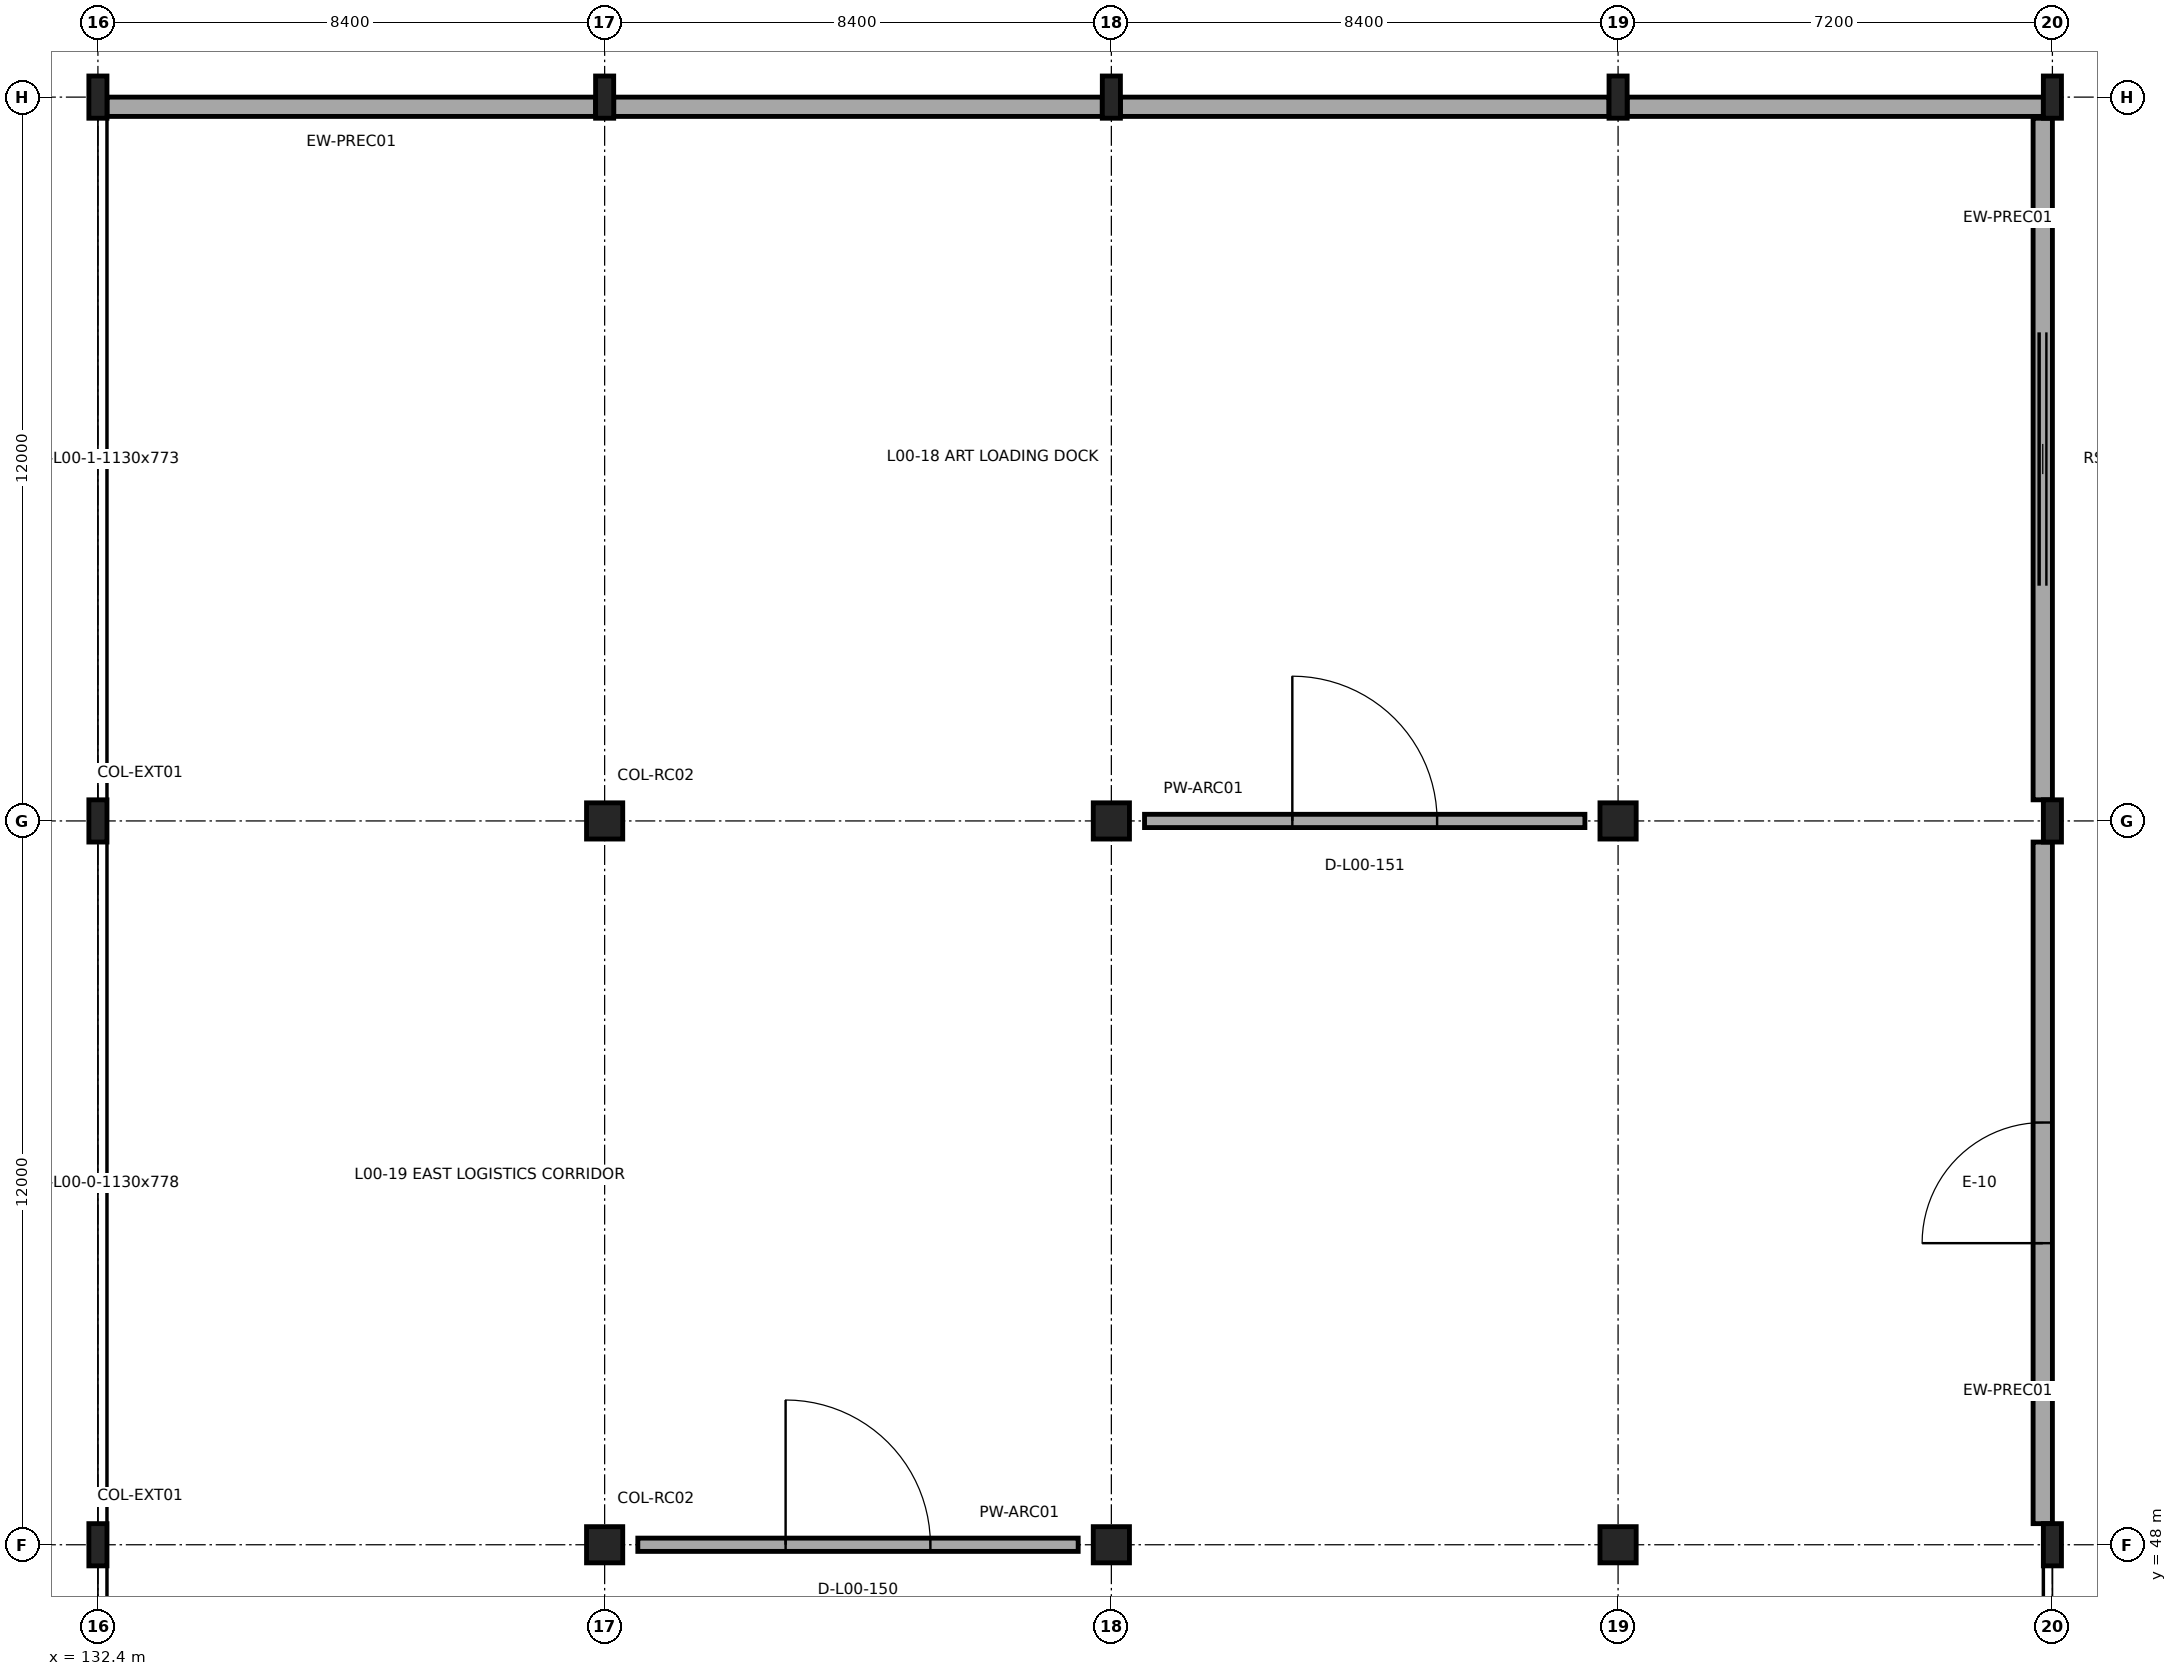
"""IFC4 building model, lengths in metres.
Left out: names, types, materials, properties, quantities, classifications, styles, units other than length and angle.
Written with IfcOpenShell. Run it as: python <this file> out.ifc"""

import sys

from ifc_helpers import new_model, si_unit, direction, frame, frame_2d, origin, origin_2d, place, context, subcontext, project, spatial, rectangle, i_section, extrude, element, fill, save


model = new_model("IFC4")
c1 = context("Model", 3, precision=1e-05, world=origin(), true_north=direction((0.0, 1.0)))
c2 = subcontext(c1, "Body", "Model", "MODEL_VIEW")
j1 = project(units=[si_unit("LENGTHUNIT", "METRE"), si_unit("PLANEANGLEUNIT", "RADIAN")], contexts=[c1])
p1 = place(None, origin())
s1 = spatial("IfcSite", under=j1, at=p1, CompositionType="ELEMENT")
p2 = place(p1, origin())
s2 = spatial("IfcBuilding", under=s1, at=p2, CompositionType="ELEMENT")
p3 = place(p2, origin())
s3 = spatial("IfcBuildingStorey", under=s2, at=p3, CompositionType="ELEMENT", Elevation=0.0)
for number, where, z_axis, x_axis in (
    (1, (132.4, 48.0, 0.0), (0.0, 0.0, 1.0), (1.0, 0.0, 0.0)),
    (2, (132.4, 60.0, 0.0), (0.0, 0.0, 1.0), (1.0, 0.0, 0.0)),
    (3, (132.4, 72.0, 0.0), (0.0, 0.0, 1.0), (1.0, 0.0, 0.0)),
):
    element("IfcColumn", number, at=place(p3, frame(where, z_axis=z_axis, x_axis=x_axis)), inside=s3, PredefinedType="COLUMN", context=c2, shape_type="SweptSolid", body=[
        extrude(i_section(OverallWidth=0.3, OverallDepth=0.7, WebThickness=0.017, FlangeThickness=0.032, FilletRadius=0.027, at=origin_2d()), origin(), (0.0, 0.0, 1.0), 8.4),
    ])
for number, where, z_axis, x_axis in (
    (4, (140.8, 48.0, 0.0), (0.0, 0.0, 1.0), (1.0, 0.0, 0.0)),
    (5, (140.8, 60.0, 0.0), (0.0, 0.0, 1.0), (1.0, 0.0, 0.0)),
):
    element("IfcColumn", number, at=place(p3, frame(where, z_axis=z_axis, x_axis=x_axis)), inside=s3, PredefinedType="COLUMN", context=c2, shape_type="SweptSolid", body=[
        extrude(rectangle(XDim=0.6, YDim=0.6, at=origin_2d()), origin(), (0.0, 0.0, 1.0), 8.4),
    ])
p4 = place(p3, frame((140.8, 72.0, 0.0), z_axis=(0.0, 0.0, 1.0), x_axis=(1.0, 0.0, 0.0)))
e6 = element("IfcColumn", 6, at=p4, inside=s3, PredefinedType="COLUMN", context=c2, shape_type="SweptSolid", body=[
    extrude(i_section(OverallWidth=0.3, OverallDepth=0.7, WebThickness=0.017, FlangeThickness=0.032, FilletRadius=0.027, at=origin_2d()), origin(), (0.0, 0.0, 1.0), 8.4),
])
for number, where, z_axis, x_axis in (
    (7, (149.2, 48.0, 0.0), (0.0, 0.0, 1.0), (1.0, 0.0, 0.0)),
    (8, (149.2, 60.0, 0.0), (0.0, 0.0, 1.0), (1.0, 0.0, 0.0)),
):
    element("IfcColumn", number, at=place(p3, frame(where, z_axis=z_axis, x_axis=x_axis)), inside=s3, PredefinedType="COLUMN", context=c2, shape_type="SweptSolid", body=[
        extrude(rectangle(XDim=0.6, YDim=0.6, at=origin_2d()), origin(), (0.0, 0.0, 1.0), 8.4),
    ])
p5 = place(p3, frame((149.2, 72.0, 0.0), z_axis=(0.0, 0.0, 1.0), x_axis=(1.0, 0.0, 0.0)))
e9 = element("IfcColumn", 9, at=p5, inside=s3, PredefinedType="COLUMN", context=c2, shape_type="SweptSolid", body=[
    extrude(i_section(OverallWidth=0.3, OverallDepth=0.7, WebThickness=0.017, FlangeThickness=0.032, FilletRadius=0.027, at=origin_2d()), origin(), (0.0, 0.0, 1.0), 8.4),
])
for number, where, z_axis, x_axis in (
    (10, (157.6, 48.0, 0.0), (0.0, 0.0, 1.0), (1.0, 0.0, 0.0)),
    (11, (157.6, 60.0, 0.0), (0.0, 0.0, 1.0), (1.0, 0.0, 0.0)),
):
    element("IfcColumn", number, at=place(p3, frame(where, z_axis=z_axis, x_axis=x_axis)), inside=s3, PredefinedType="COLUMN", context=c2, shape_type="SweptSolid", body=[
        extrude(rectangle(XDim=0.6, YDim=0.6, at=origin_2d()), origin(), (0.0, 0.0, 1.0), 8.4),
    ])
for number, where, z_axis, x_axis in (
    (12, (157.6, 72.0, 0.0), (0.0, 0.0, 1.0), (1.0, 0.0, 0.0)),
    (13, (164.8, 48.0, 0.0), (0.0, 0.0, 1.0), (1.0, 0.0, 0.0)),
    (14, (164.8, 60.0, 0.0), (0.0, 0.0, 1.0), (1.0, 0.0, 0.0)),
    (15, (164.8, 72.0, 0.0), (0.0, 0.0, 1.0), (1.0, 0.0, 0.0)),
):
    element("IfcColumn", number, at=place(p3, frame(where, z_axis=z_axis, x_axis=x_axis)), inside=s3, PredefinedType="COLUMN", context=c2, shape_type="SweptSolid", body=[
        extrude(i_section(OverallWidth=0.3, OverallDepth=0.7, WebThickness=0.017, FlangeThickness=0.032, FilletRadius=0.027, at=origin_2d()), origin(), (0.0, 0.0, 1.0), 8.4),
    ])
p6 = place(p3, frame((164.64, 48.35, 0.0), z_axis=(0.0, 0.0, 1.0), x_axis=(0.0, 1.0, 0.0)))
e16 = element("IfcWall", 16, at=p6, inside=s3, PredefinedType="SOLIDWALL", context=c2, shape_type="SweptSolid", body=[
    extrude(rectangle(XDim=11.3, YDim=0.32, at=frame_2d((5.65, 0.0))), origin(), (0.0, 0.0, 1.0), 7.78),
])
p7 = place(p6, frame((4.65, 0.0, 0.0)))
e17 = element("IfcOpeningElement", 17, at=p7, cuts=e16, PredefinedType="OPENING", context=c2, shape_type="SweptSolid", body=[
    extrude(rectangle(XDim=2.0, YDim=2.4, at=frame_2d((1.0, 1.2))), frame((0.0, 0.17, 0.0), z_axis=(0.0, -1.0, 0.0), x_axis=(1.0, 0.0, 0.0)), (0.0, 0.0, 1.0), 0.34),
])
p8 = place(p3, frame((164.64, 60.35, 0.0), z_axis=(0.0, 0.0, 1.0), x_axis=(0.0, 1.0, 0.0)))
e18 = element("IfcWall", 18, at=p8, inside=s3, PredefinedType="SOLIDWALL", context=c2, shape_type="SweptSolid", body=[
    extrude(rectangle(XDim=11.3, YDim=0.32, at=frame_2d((5.65, 0.0))), origin(), (0.0, 0.0, 1.0), 7.78),
])
p9 = place(p8, frame((3.55, 0.0, 0.0)))
e19 = element("IfcOpeningElement", 19, at=p9, cuts=e18, PredefinedType="OPENING", context=c2, shape_type="SweptSolid", body=[
    extrude(rectangle(XDim=4.2, YDim=4.2, at=frame_2d((2.1, 2.1))), frame((0.0, 0.17, 0.0), z_axis=(0.0, -1.0, 0.0), x_axis=(1.0, 0.0, 0.0)), (0.0, 0.0, 1.0), 0.34),
])
p10 = place(p3, frame((140.65, 71.84, 0.0), z_axis=(0.0, 0.0, 1.0), x_axis=(-1.0, 0.0, 0.0)))
e20 = element("IfcWall", 20, at=p10, inside=s3, PredefinedType="SOLIDWALL", context=c2, shape_type="SweptSolid", body=[
    extrude(rectangle(XDim=8.1, YDim=0.32, at=frame_2d((4.05, 0.0))), origin(), (0.0, 0.0, 1.0), 7.582),
])
p11 = place(p3, frame((149.05, 71.84, 0.0), z_axis=(0.0, 0.0, 1.0), x_axis=(-1.0, 0.0, 0.0)))
e21 = element("IfcWall", 21, at=p11, inside=s3, PredefinedType="SOLIDWALL", context=c2, shape_type="SweptSolid", body=[
    extrude(rectangle(XDim=8.1, YDim=0.32, at=frame_2d((4.05, 0.0))), origin(), (0.0, 0.0, 1.0), 7.582),
])
p12 = place(p3, frame((157.45, 71.84, 0.0), z_axis=(0.0, 0.0, 1.0), x_axis=(-1.0, 0.0, 0.0)))
e22 = element("IfcWall", 22, at=p12, inside=s3, PredefinedType="SOLIDWALL", context=c2, shape_type="SweptSolid", body=[
    extrude(rectangle(XDim=8.1, YDim=0.32, at=frame_2d((4.05, 0.0))), origin(), (0.0, 0.0, 1.0), 4.382),
])
p13 = place(p3, frame((164.65, 71.84, 0.0), z_axis=(0.0, 0.0, 1.0), x_axis=(-1.0, 0.0, 0.0)))
e23 = element("IfcWall", 23, at=p13, inside=s3, PredefinedType="SOLIDWALL", context=c2, shape_type="SweptSolid", body=[
    extrude(rectangle(XDim=6.9, YDim=0.32, at=frame_2d((3.45, 0.0))), origin(), (0.0, 0.0, 1.0), 4.382),
])
p14 = place(p3, frame((141.35, 48.0, 0.0), z_axis=(0.0, 0.0, 1.0), x_axis=(1.0, 0.0, 0.0)))
e24 = element("IfcWall", 24, at=p14, inside=s3, PredefinedType="PARTITIONING", context=c2, shape_type="SweptSolid", body=[
    extrude(rectangle(XDim=7.3, YDim=0.22, at=frame_2d((3.65, 0.0))), origin(), (0.0, 0.0, 1.0), 7.582),
])
p15 = place(p14, frame((2.45, 0.0, 0.0)))
e25 = element("IfcOpeningElement", 25, at=p15, cuts=e24, PredefinedType="OPENING", context=c2, shape_type="SweptSolid", body=[
    extrude(rectangle(XDim=2.4, YDim=2.6, at=frame_2d((1.2, 1.3))), frame((0.0, 0.12, 0.0), z_axis=(0.0, -1.0, 0.0), x_axis=(1.0, 0.0, 0.0)), (0.0, 0.0, 1.0), 0.24),
])
p16 = place(p3, frame((149.75, 60.0, 0.0), z_axis=(0.0, 0.0, 1.0), x_axis=(1.0, 0.0, 0.0)))
e26 = element("IfcWall", 26, at=p16, inside=s3, PredefinedType="PARTITIONING", context=c2, shape_type="SweptSolid", body=[
    extrude(rectangle(XDim=7.3, YDim=0.22, at=frame_2d((3.65, 0.0))), origin(), (0.0, 0.0, 1.0), 7.582),
])
p17 = place(p16, frame((2.45, 0.0, 0.0)))
e27 = element("IfcOpeningElement", 27, at=p17, cuts=e26, PredefinedType="OPENING", context=c2, shape_type="SweptSolid", body=[
    extrude(rectangle(XDim=2.4, YDim=2.6, at=frame_2d((1.2, 1.3))), frame((0.0, 0.12, 0.0), z_axis=(0.0, -1.0, 0.0), x_axis=(1.0, 0.0, 0.0)), (0.0, 0.0, 1.0), 0.24),
])
p18 = place(p7, frame((2.0, 0.0, 0.0), z_axis=(0.0, 0.0, 1.0), x_axis=(-1.0, 0.0, 0.0)))
e28 = element("IfcDoor", 28, at=p18, inside=s3, OperationType="DOUBLE_DOOR_SINGLE_SWING", PredefinedType="DOOR", context=c2, shape_type="SweptSolid", body=[
    extrude(rectangle(XDim=2.0, YDim=2.4, at=frame_2d((1.0, 1.2))), frame((0.0, 0.025, 0.0), z_axis=(0.0, -1.0, 0.0), x_axis=(1.0, 0.0, 0.0)), (0.0, 0.0, 1.0), 0.05),
])
fill(e17, e28)
p19 = place(p9, origin())
e29 = element("IfcDoor", 29, at=p19, inside=s3, OperationType="SLIDING_TO_LEFT", PredefinedType="DOOR", context=c2, shape_type="SweptSolid", body=[
    extrude(rectangle(XDim=4.2, YDim=4.2, at=frame_2d((2.1, 2.1))), frame((0.0, 0.025, 0.0), z_axis=(0.0, -1.0, 0.0), x_axis=(1.0, 0.0, 0.0)), (0.0, 0.0, 1.0), 0.05),
])
fill(e19, e29)
p20 = place(p15, origin())
e30 = element("IfcDoor", 30, at=p20, inside=s3, OperationType="DOUBLE_DOOR_SINGLE_SWING", PredefinedType="DOOR", context=c2, shape_type="SweptSolid", body=[
    extrude(rectangle(XDim=2.4, YDim=2.6, at=frame_2d((1.2, 1.3))), frame((0.0, 0.025, 0.0), z_axis=(0.0, -1.0, 0.0), x_axis=(1.0, 0.0, 0.0)), (0.0, 0.0, 1.0), 0.05),
])
fill(e25, e30)
p21 = place(p17, origin())
e31 = element("IfcDoor", 31, at=p21, inside=s3, OperationType="DOUBLE_DOOR_SINGLE_SWING", PredefinedType="DOOR", context=c2, shape_type="SweptSolid", body=[
    extrude(rectangle(XDim=2.4, YDim=2.6, at=frame_2d((1.2, 1.3))), frame((0.0, 0.025, 0.0), z_axis=(0.0, -1.0, 0.0), x_axis=(1.0, 0.0, 0.0)), (0.0, 0.0, 1.0), 0.05),
])
fill(e27, e31)
save(model, sys.argv[1])
